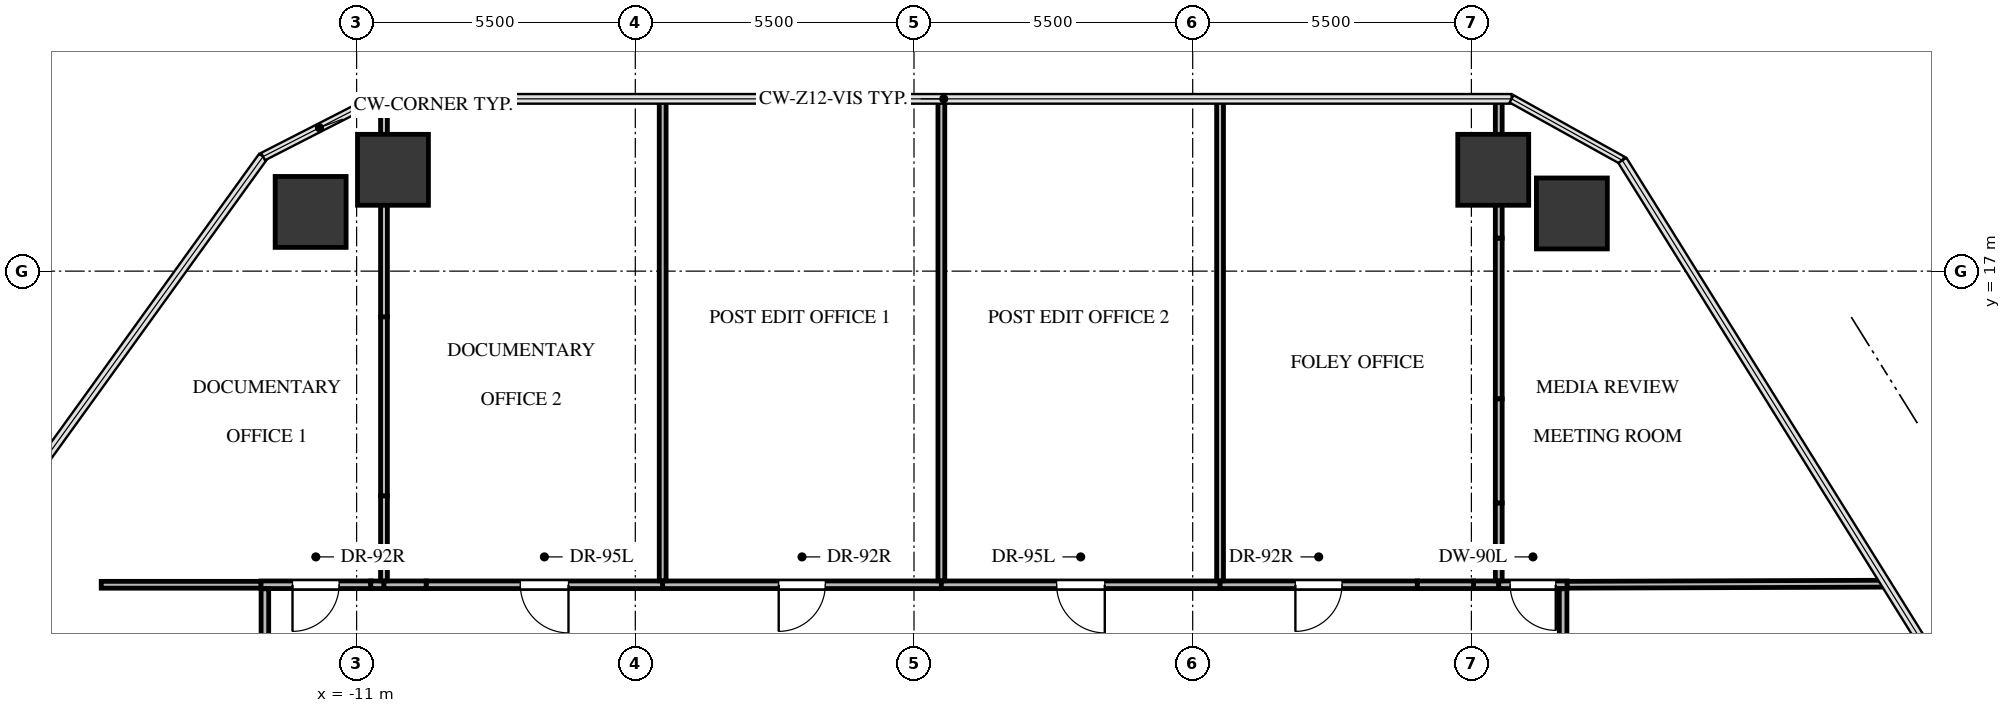
"""IFC4 building model, lengths in metres.
Left out: names, types, materials, properties, quantities, classifications, styles, units other than length and angle.
Written with IfcOpenShell. Run it as: python <this file> out.ifc"""

import sys

from ifc_helpers import new_model, si_unit, direction, frame, frame_2d, origin, origin_2d, place, context, subcontext, project, spatial, rectangle, extrude, source, transform, mapped, element, fill, save


model = new_model("IFC4")
c1 = context("Model", 3, precision=1e-05, world=origin(), true_north=direction((0.0, 1.0)))
c2 = subcontext(c1, "Body", "Model", "MODEL_VIEW")
j1 = project(units=[si_unit("LENGTHUNIT", "METRE"), si_unit("PLANEANGLEUNIT", "RADIAN")], contexts=[c1])
p1 = place(None, origin())
s1 = spatial("IfcSite", under=j1, at=p1, CompositionType="ELEMENT")
p2 = place(p1, origin())
s2 = spatial("IfcBuilding", under=s1, at=p2, CompositionType="ELEMENT")
p3 = place(p2, frame((0.0, 0.0, 72.0)))
s3 = spatial("IfcBuildingStorey", under=s2, at=p3, CompositionType="ELEMENT", Elevation=72.0)
m1 = source(origin(), c2, "Body", "SweptSolid", [
    extrude(rectangle(XDim=1.4, YDim=1.4, at=origin_2d()), origin(), (0.0, 0.0, 1.0), 3.3),
])
for number, where, z_axis, x_axis in (
    (1, (-11.907, 18.168, -0.24), (0.0, 0.0, 1.0), (1.0, 0.0, 0.0)),
    (2, (-10.283, 19.0, -0.24), (0.0, 0.0, 1.0), (1.0, 0.0, 0.0)),
    (3, (11.431, 19.0, -0.24), (0.0, 0.0, 1.0), (1.0, 0.0, 0.0)),
    (4, (12.983, 18.138, -0.24), (0.0, 0.0, 1.0), (1.0, 0.0, 0.0)),
):
    element("IfcColumn", number, at=place(p3, frame(where, z_axis=z_axis, x_axis=x_axis)), inside=s3, PredefinedType="COLUMN", context=c2, shape_type="MappedRepresentation", body=[
        mapped(m1, transform((0.0, 0.0, 0.0), x_axis=(1.0, 0.0, 0.0), y_axis=(0.0, 1.0, 0.0), z_axis=(0.0, 0.0, 1.0), scale=1.0)),
    ])
p4 = place(p3, frame((-10.72, 10.81, 0.0), z_axis=(0.0, 0.0, 1.0), x_axis=(-1.0, 0.0, 0.0)))
e5 = element("IfcWall", 5, at=p4, inside=s3, PredefinedType="PARTITIONING", context=c2, shape_type="SweptSolid", body=[
    extrude(rectangle(XDim=2.17, YDim=0.15, at=frame_2d((1.085, 0.0))), origin(), (0.0, 0.0, 1.0), 3.045),
])
p5 = place(p4, frame((0.625, 0.0, 0.0)))
e6 = element("IfcOpeningElement", 6, at=p5, cuts=e5, PredefinedType="OPENING", context=c2, shape_type="SweptSolid", body=[
    extrude(rectangle(XDim=0.92, YDim=2.1, at=frame_2d((0.46, 1.05))), frame((0.0, 0.085, 0.0), z_axis=(0.0, -1.0, 0.0), x_axis=(1.0, 0.0, 0.0)), (0.0, 0.0, 1.0), 0.17),
])
p6 = place(p3, frame((-10.46, 10.81, 0.0), z_axis=(0.0, 0.0, 1.0), x_axis=(-1.0, 0.0, 0.0)))
e7 = element("IfcWall", 7, at=p6, inside=s3, PredefinedType="PARTITIONING", context=c2, shape_type="SweptSolid", body=[
    extrude(rectangle(XDim=0.26, YDim=0.15, at=frame_2d((0.13, 0.0))), origin(), (0.0, 0.0, 1.0), 2.13),
])
p7 = place(p3, frame((-4.96, 10.81, 0.0), z_axis=(0.0, 0.0, 1.0), x_axis=(-1.0, 0.0, 0.0)))
e8 = element("IfcWall", 8, at=p7, inside=s3, PredefinedType="PARTITIONING", context=c2, shape_type="SweptSolid", body=[
    extrude(rectangle(XDim=4.667, YDim=0.15, at=frame_2d((2.334, 0.0))), origin(), (0.0, 0.0, 1.0), 2.598),
])
p8 = place(p7, frame((1.859, 0.0, 0.0)))
e9 = element("IfcOpeningElement", 9, at=p8, cuts=e8, PredefinedType="OPENING", context=c2, shape_type="SweptSolid", body=[
    extrude(rectangle(XDim=0.95, YDim=2.1, at=frame_2d((0.475, 1.05))), frame((0.0, 0.085, 0.0), z_axis=(0.0, -1.0, 0.0), x_axis=(1.0, 0.0, 0.0)), (0.0, 0.0, 1.0), 0.17),
])
p9 = place(p3, frame((-9.627, 10.81, 0.0), z_axis=(0.0, 0.0, 1.0), x_axis=(-1.0, 0.0, 0.0)))
e10 = element("IfcWall", 10, at=p9, inside=s3, PredefinedType="PARTITIONING", context=c2, shape_type="SweptSolid", body=[
    extrude(rectangle(XDim=0.833, YDim=0.15, at=frame_2d((0.416, 0.0))), origin(), (0.0, 0.0, 1.0), 2.13),
])
p10 = place(p3, frame((0.54, 10.81, 0.0), z_axis=(0.0, 0.0, 1.0), x_axis=(-1.0, 0.0, 0.0)))
e11 = element("IfcWall", 11, at=p10, inside=s3, PredefinedType="PARTITIONING", context=c2, shape_type="SweptSolid", body=[
    extrude(rectangle(XDim=5.5, YDim=0.15, at=frame_2d((2.75, 0.0))), origin(), (0.0, 0.0, 1.0), 3.045),
])
p11 = place(p10, frame((2.29, 0.0, 0.0)))
e12 = element("IfcOpeningElement", 12, at=p11, cuts=e11, PredefinedType="OPENING", context=c2, shape_type="SweptSolid", body=[
    extrude(rectangle(XDim=0.92, YDim=2.1, at=frame_2d((0.46, 1.05))), frame((0.0, 0.085, 0.0), z_axis=(0.0, -1.0, 0.0), x_axis=(1.0, 0.0, 0.0)), (0.0, 0.0, 1.0), 0.17),
])
p12 = place(p3, frame((6.04, 10.81, 0.0), z_axis=(0.0, 0.0, 1.0), x_axis=(-1.0, 0.0, 0.0)))
e13 = element("IfcWall", 13, at=p12, inside=s3, PredefinedType="PARTITIONING", context=c2, shape_type="SweptSolid", body=[
    extrude(rectangle(XDim=5.5, YDim=0.15, at=frame_2d((2.75, 0.0))), origin(), (0.0, 0.0, 1.0), 2.598),
])
p13 = place(p12, frame((2.275, 0.0, 0.0)))
e14 = element("IfcOpeningElement", 14, at=p13, cuts=e13, PredefinedType="OPENING", context=c2, shape_type="SweptSolid", body=[
    extrude(rectangle(XDim=0.95, YDim=2.1, at=frame_2d((0.475, 1.05))), frame((0.0, 0.085, 0.0), z_axis=(0.0, -1.0, 0.0), x_axis=(1.0, 0.0, 0.0)), (0.0, 0.0, 1.0), 0.17),
])
p14 = place(p3, frame((11.54, 10.81, 0.0), z_axis=(0.0, 0.0, 1.0), x_axis=(-1.0, 0.0, 0.0)))
e15 = element("IfcWall", 15, at=p14, inside=s3, PredefinedType="PARTITIONING", context=c2, shape_type="SweptSolid", body=[
    extrude(rectangle(XDim=0.498, YDim=0.15, at=frame_2d((0.249, 0.0))), origin(), (0.0, 0.0, 1.0), 3.045),
])
p15 = place(p3, frame((9.933, 10.81, 0.0), z_axis=(0.0, 0.0, 1.0), x_axis=(-1.0, 0.0, 0.0)))
e16 = element("IfcWall", 16, at=p15, inside=s3, PredefinedType="PARTITIONING", context=c2, shape_type="SweptSolid", body=[
    extrude(rectangle(XDim=3.893, YDim=0.15, at=frame_2d((1.947, 0.0))), origin(), (0.0, 0.0, 1.0), 3.045),
])
p16 = place(p15, frame((1.487, 0.0, 0.0)))
e17 = element("IfcOpeningElement", 17, at=p16, cuts=e16, PredefinedType="OPENING", context=c2, shape_type="SweptSolid", body=[
    extrude(rectangle(XDim=0.92, YDim=2.1, at=frame_2d((0.46, 1.05))), frame((0.0, 0.085, 0.0), z_axis=(0.0, -1.0, 0.0), x_axis=(1.0, 0.0, 0.0)), (0.0, 0.0, 1.0), 0.17),
])
p17 = place(p3, frame((11.042, 10.81, 0.0), z_axis=(0.0, 0.0, 1.0), x_axis=(-1.0, 0.0, 0.0)))
e18 = element("IfcWall", 18, at=p17, inside=s3, PredefinedType="PARTITIONING", context=c2, shape_type="SweptSolid", body=[
    extrude(rectangle(XDim=1.109, YDim=0.15, at=frame_2d((0.555, 0.0))), origin(), (0.0, 0.0, 1.0), 2.13),
])
p18 = place(p3, frame((12.89, 10.81, 0.0), z_axis=(0.0, 0.0, 1.0), x_axis=(-1.0, 0.0, 0.0)))
e19 = element("IfcWall", 19, at=p18, inside=s3, PredefinedType="PARTITIONING", context=c2, shape_type="SweptSolid", body=[
    extrude(rectangle(XDim=1.35, YDim=0.15, at=frame_2d((0.675, 0.0))), origin(), (0.0, 0.0, 1.0), 3.045),
])
p19 = place(p18, frame((0.225, 0.0, 0.0)))
e20 = element("IfcOpeningElement", 20, at=p19, cuts=e19, PredefinedType="OPENING", context=c2, shape_type="SweptSolid", body=[
    extrude(rectangle(XDim=0.9, YDim=2.05, at=frame_2d((0.45, 1.025))), frame((0.0, 0.085, 0.0), z_axis=(0.0, -1.0, 0.0), x_axis=(1.0, 0.0, 0.0)), (0.0, 0.0, 1.0), 0.17),
])
p20 = place(p3, frame((-12.81, 10.731, 0.0), z_axis=(0.0, 0.0, 1.0), x_axis=(0.0, -1.0, 0.0)))
e21 = element("IfcWall", 21, at=p20, inside=s3, PredefinedType="PARTITIONING", context=c2, shape_type="SweptSolid", body=[
    extrude(rectangle(XDim=6.191, YDim=0.15, at=frame_2d((3.095, 0.0))), origin(), (0.0, 0.0, 1.0), 3.045),
])
p21 = place(p20, frame((2.621, 0.0, 0.0)))
e22 = element("IfcOpeningElement", 22, at=p21, cuts=e21, PredefinedType="OPENING", context=c2, shape_type="SweptSolid", body=[
    extrude(rectangle(XDim=0.95, YDim=2.1, at=frame_2d((0.475, 1.05))), frame((0.0, 0.085, 0.0), z_axis=(0.0, -1.0, 0.0), x_axis=(1.0, 0.0, 0.0)), (0.0, 0.0, 1.0), 0.17),
])
p22 = place(p3, frame((12.81, 4.54, 0.0), z_axis=(0.0, 0.0, 1.0), x_axis=(0.0, 1.0, 0.0)))
e23 = element("IfcWall", 23, at=p22, inside=s3, PredefinedType="PARTITIONING", context=c2, shape_type="SweptSolid", body=[
    extrude(rectangle(XDim=6.191, YDim=0.15, at=frame_2d((3.095, 0.0))), origin(), (0.0, 0.0, 1.0), 3.045),
])
p23 = place(p22, frame((2.646, 0.0, 0.0)))
e24 = element("IfcOpeningElement", 24, at=p23, cuts=e23, PredefinedType="OPENING", context=c2, shape_type="SweptSolid", body=[
    extrude(rectangle(XDim=0.9, YDim=2.05, at=frame_2d((0.45, 1.025))), frame((0.0, 0.085, 0.0), z_axis=(0.0, -1.0, 0.0), x_axis=(1.0, 0.0, 0.0)), (0.0, 0.0, 1.0), 0.17),
])
p24 = place(p3, frame((-10.46, 16.098, 0.0), z_axis=(0.0, 0.0, 1.0), x_axis=(0.0, -1.0, 0.0)))
e25 = element("IfcWall", 25, at=p24, inside=s3, PredefinedType="PARTITIONING", context=c2, shape_type="SweptSolid", body=[
    extrude(rectangle(XDim=3.535, YDim=0.135, at=frame_2d((1.768, 0.0))), origin(), (0.0, 0.0, 1.0), 2.13),
])
p25 = place(p3, frame((-10.46, 20.4, 0.0), z_axis=(0.0, 0.0, 1.0), x_axis=(0.0, -1.0, 0.0)))
e26 = element("IfcWall", 26, at=p25, inside=s3, PredefinedType="PARTITIONING", context=c2, shape_type="SweptSolid", body=[
    extrude(rectangle(XDim=1.316, YDim=0.135, at=frame_2d((0.658, 0.0))), origin(), (0.0, 0.0, 1.0), 1.877),
])
p26 = place(p3, frame((-10.46, 19.052, 0.0), z_axis=(0.0, 0.0, 1.0), x_axis=(0.0, -1.0, 0.0)))
e27 = element("IfcWall", 27, at=p26, inside=s3, PredefinedType="PARTITIONING", context=c2, shape_type="SweptSolid", body=[
    extrude(rectangle(XDim=2.954, YDim=0.135, at=frame_2d((1.477, 0.0))), origin(), (0.0, 0.0, 1.0), 2.13),
])
p27 = place(p3, frame((-10.46, 12.563, 0.0), z_axis=(0.0, 0.0, 1.0), x_axis=(0.0, -1.0, 0.0)))
e28 = element("IfcWall", 28, at=p27, inside=s3, PredefinedType="PARTITIONING", context=c2, shape_type="SweptSolid", body=[
    extrude(rectangle(XDim=1.675, YDim=0.135, at=frame_2d((0.837, 0.0))), origin(), (0.0, 0.0, 1.0), 2.13),
])
p28 = place(p3, frame((-12.89, 10.81, 0.0), z_axis=(0.0, 0.0, 1.0), x_axis=(-1.0, 0.0, 0.0)))
e29 = element("IfcWall", 29, at=p28, inside=s3, PredefinedType="PARTITIONING", context=c2, shape_type="SweptSolid", body=[
    extrude(rectangle(XDim=3.15, YDim=0.135, at=frame_2d((1.575, 0.0))), origin(), (0.0, 0.0, 1.0), 3.045),
])
for number, where, z_axis, x_axis in (
    (30, (-4.96, 20.4, 0.0), (0.0, 0.0, 1.0), (0.0, -1.0, 0.0)),
    (31, (0.54, 20.4, 0.0), (0.0, 0.0, 1.0), (0.0, -1.0, 0.0)),
    (32, (6.04, 20.4, 0.0), (0.0, 0.0, 1.0), (0.0, -1.0, 0.0)),
):
    element("IfcWall", number, at=place(p3, frame(where, z_axis=z_axis, x_axis=x_axis)), inside=s3, PredefinedType="PARTITIONING", context=c2, shape_type="SweptSolid", body=[
        extrude(rectangle(XDim=9.511, YDim=0.135, at=frame_2d((4.755, 0.0))), origin(), (0.0, 0.0, 1.0), 2.38),
    ])
p29 = place(p3, frame((11.54, 17.652, 0.0), z_axis=(0.0, 0.0, 1.0), x_axis=(0.0, -1.0, 0.0)))
e33 = element("IfcWall", 33, at=p29, inside=s3, PredefinedType="PARTITIONING", context=c2, shape_type="SweptSolid", body=[
    extrude(rectangle(XDim=3.173, YDim=0.135, at=frame_2d((1.586, 0.0))), origin(), (0.0, 0.0, 1.0), 2.13),
])
p30 = place(p3, frame((11.54, 12.426, 0.0), z_axis=(0.0, 0.0, 1.0), x_axis=(0.0, -1.0, 0.0)))
e34 = element("IfcWall", 34, at=p30, inside=s3, PredefinedType="PARTITIONING", context=c2, shape_type="SweptSolid", body=[
    extrude(rectangle(XDim=1.537, YDim=0.135, at=frame_2d((0.768, 0.0))), origin(), (0.0, 0.0, 1.0), 2.13),
])
p31 = place(p3, frame((11.54, 20.4, 0.0), z_axis=(0.0, 0.0, 1.0), x_axis=(0.0, -1.0, 0.0)))
e35 = element("IfcWall", 35, at=p31, inside=s3, PredefinedType="PARTITIONING", context=c2, shape_type="SweptSolid", body=[
    extrude(rectangle(XDim=1.316, YDim=0.135, at=frame_2d((0.658, 0.0))), origin(), (0.0, 0.0, 1.0), 1.877),
])
p32 = place(p3, frame((11.54, 19.045, 0.0), z_axis=(0.0, 0.0, 1.0), x_axis=(0.0, -1.0, 0.0)))
e36 = element("IfcWall", 36, at=p32, inside=s3, PredefinedType="PARTITIONING", context=c2, shape_type="SweptSolid", body=[
    extrude(rectangle(XDim=1.393, YDim=0.135, at=frame_2d((0.697, 0.0))), origin(), (0.0, 0.0, 1.0), 2.13),
])
p33 = place(p3, frame((11.54, 14.479, 0.0), z_axis=(0.0, 0.0, 1.0), x_axis=(0.0, -1.0, 0.0)))
e37 = element("IfcWall", 37, at=p33, inside=s3, PredefinedType="PARTITIONING", context=c2, shape_type="SweptSolid", body=[
    extrude(rectangle(XDim=2.053, YDim=0.135, at=frame_2d((1.026, 0.0))), origin(), (0.0, 0.0, 1.0), 2.13),
])
p34 = place(p3, frame((19.182, 10.831, 0.0), z_axis=(0.0, 0.0, 1.0), x_axis=(-0.999994432845, -0.003336806783, 0.0)))
e38 = element("IfcWall", 38, at=p34, inside=s3, PredefinedType="PARTITIONING", context=c2, shape_type="SweptSolid", body=[
    extrude(rectangle(XDim=6.292, YDim=0.135, at=frame_2d((3.146, 0.0))), origin(), (0.0, 0.0, 1.0), 2.38),
])
m2 = source(origin(), c2, "Body", "SweptSolid", [
    extrude(rectangle(XDim=0.92, YDim=2.1, at=frame_2d((0.46, 1.05))), frame((0.0, 0.025, 0.0), z_axis=(0.0, -1.0, 0.0), x_axis=(1.0, 0.0, 0.0)), (0.0, 0.0, 1.0), 0.05),
])
p35 = place(p5, origin())
e39 = element("IfcDoor", 39, at=p35, inside=s3, OperationType="SINGLE_SWING_RIGHT", PredefinedType="DOOR", context=c2, shape_type="MappedRepresentation", body=[
    mapped(m2, transform((0.0, 0.0, 0.0), x_axis=(1.0, 0.0, 0.0), y_axis=(0.0, 1.0, 0.0), z_axis=(0.0, 0.0, 1.0), scale=1.0)),
])
fill(e6, e39)
m3 = source(origin(), c2, "Body", "SweptSolid", [
    extrude(rectangle(XDim=0.95, YDim=2.1, at=frame_2d((0.475, 1.05))), frame((0.0, 0.025, 0.0), z_axis=(0.0, -1.0, 0.0), x_axis=(1.0, 0.0, 0.0)), (0.0, 0.0, 1.0), 0.05),
])
p36 = place(p8, origin())
e40 = element("IfcDoor", 40, at=p36, inside=s3, OperationType="SINGLE_SWING_LEFT", PredefinedType="DOOR", context=c2, shape_type="MappedRepresentation", body=[
    mapped(m3, transform((0.0, 0.0, 0.0), x_axis=(1.0, 0.0, 0.0), y_axis=(0.0, 1.0, 0.0), z_axis=(0.0, 0.0, 1.0), scale=1.0)),
])
fill(e9, e40)
p37 = place(p11, origin())
e41 = element("IfcDoor", 41, at=p37, inside=s3, OperationType="SINGLE_SWING_RIGHT", PredefinedType="DOOR", context=c2, shape_type="MappedRepresentation", body=[
    mapped(m2, transform((0.0, 0.0, 0.0), x_axis=(1.0, 0.0, 0.0), y_axis=(0.0, 1.0, 0.0), z_axis=(0.0, 0.0, 1.0), scale=1.0)),
])
fill(e12, e41)
p38 = place(p13, origin())
e42 = element("IfcDoor", 42, at=p38, inside=s3, OperationType="SINGLE_SWING_LEFT", PredefinedType="DOOR", context=c2, shape_type="MappedRepresentation", body=[
    mapped(m3, transform((0.0, 0.0, 0.0), x_axis=(1.0, 0.0, 0.0), y_axis=(0.0, 1.0, 0.0), z_axis=(0.0, 0.0, 1.0), scale=1.0)),
])
fill(e14, e42)
p39 = place(p16, origin())
e43 = element("IfcDoor", 43, at=p39, inside=s3, OperationType="SINGLE_SWING_RIGHT", PredefinedType="DOOR", context=c2, shape_type="MappedRepresentation", body=[
    mapped(m2, transform((0.0, 0.0, 0.0), x_axis=(1.0, 0.0, 0.0), y_axis=(0.0, 1.0, 0.0), z_axis=(0.0, 0.0, 1.0), scale=1.0)),
])
fill(e17, e43)
m4 = source(origin(), c2, "Body", "SweptSolid", [
    extrude(rectangle(XDim=0.9, YDim=2.05, at=frame_2d((0.45, 1.025))), frame((0.0, 0.025, 0.0), z_axis=(0.0, -1.0, 0.0), x_axis=(1.0, 0.0, 0.0)), (0.0, 0.0, 1.0), 0.05),
])
p40 = place(p19, origin())
e44 = element("IfcDoor", 44, at=p40, inside=s3, OperationType="SINGLE_SWING_LEFT", PredefinedType="DOOR", context=c2, shape_type="MappedRepresentation", body=[
    mapped(m4, transform((0.0, 0.0, 0.0), x_axis=(1.0, 0.0, 0.0), y_axis=(0.0, 1.0, 0.0), z_axis=(0.0, 0.0, 1.0), scale=1.0)),
])
fill(e20, e44)
save(model, sys.argv[1])
